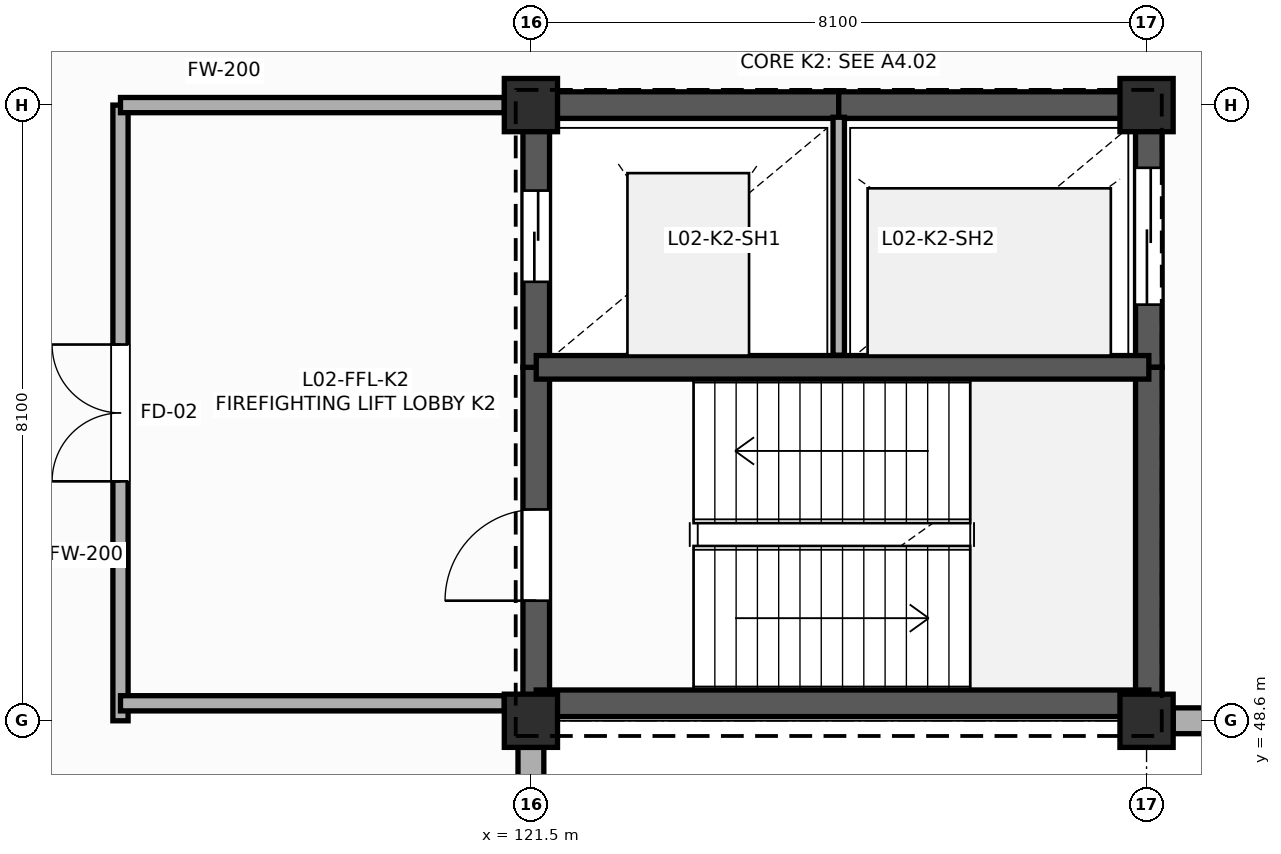
"""IFC4 building model, lengths in metres.
Left out: names, types, materials, properties, quantities, classifications, styles, units other than length and angle.
Written with IfcOpenShell. Run it as: python <this file> out.ifc"""

import sys

from ifc_helpers import new_model, si_unit, direction, frame, frame_2d, origin, origin_2d, place, context, subcontext, project, spatial, rectangle, extrude, element, fill, save


model = new_model("IFC4")
c1 = context("Model", 3, precision=1e-05, world=origin(), true_north=direction((0.0, 1.0)))
c2 = subcontext(c1, "Body", "Model", "MODEL_VIEW")
j1 = project(units=[si_unit("LENGTHUNIT", "METRE"), si_unit("PLANEANGLEUNIT", "RADIAN")], contexts=[c1])
p1 = place(None, origin())
s1 = spatial("IfcSite", under=j1, at=p1, CompositionType="ELEMENT")
p2 = place(p1, origin())
s2 = spatial("IfcBuilding", under=s1, at=p2, CompositionType="ELEMENT")
p3 = place(p2, frame((0.0, 0.0, 10.2)))
s3 = spatial("IfcBuildingStorey", under=s2, at=p3, CompositionType="ELEMENT", Elevation=10.2)
for number, where, z_axis, x_axis in (
    (1, (121.5, 48.6, 0.0), (0.0, 0.0, 1.0), (1.0, 0.0, 0.0)),
    (2, (121.5, 56.7, 0.0), (0.0, 0.0, 1.0), (1.0, 0.0, 0.0)),
    (3, (129.6, 48.6, 0.0), (0.0, 0.0, 1.0), (1.0, 0.0, 0.0)),
    (4, (129.6, 56.7, 0.0), (0.0, 0.0, 1.0), (1.0, 0.0, 0.0)),
):
    element("IfcColumn", number, at=place(p3, frame(where, z_axis=z_axis, x_axis=x_axis)), inside=s3, PredefinedType="COLUMN", context=c2, shape_type="SweptSolid", body=[
        extrude(rectangle(XDim=0.7, YDim=0.7, at=origin_2d()), origin(), (0.0, 0.0, 1.0), 4.8),
    ])
p4 = place(p3, frame((121.5, 40.8, 0.0), z_axis=(0.0, 0.0, 1.0), x_axis=(0.0, 1.0, 0.0)))
e5 = element("IfcWall", 5, at=p4, inside=s3, PredefinedType="SOLIDWALL", context=c2, shape_type="SweptSolid", body=[
    extrude(rectangle(XDim=7.45, YDim=0.34, at=frame_2d((3.725, 0.0))), origin(), (0.0, 0.0, 1.0), 4.207),
])
p5 = place(p3, frame((129.95, 48.6, 0.0), z_axis=(0.0, 0.0, 1.0), x_axis=(1.0, 0.0, 0.0)))
e6 = element("IfcWall", 6, at=p5, inside=s3, PredefinedType="SOLIDWALL", context=c2, shape_type="SweptSolid", body=[
    extrude(rectangle(XDim=7.4, YDim=0.34, at=frame_2d((3.7, 0.0))), origin(), (0.0, 0.0, 1.0), 4.075),
])
p6 = place(p3, frame((121.57, 48.83, 0.0), z_axis=(0.0, 0.0, 1.0), x_axis=(0.0, 1.0, 0.0)))
e7 = element("IfcWall", 7, at=p6, inside=s3, PredefinedType="SHEAR", context=c2, shape_type="SweptSolid", body=[
    extrude(rectangle(XDim=4.42, YDim=0.35, at=frame_2d((2.21, 0.0))), origin(), (0.0, 0.0, 1.0), 4.8),
])
p7 = place(p6, frame((1.35, 0.0, 0.0)))
e8 = element("IfcOpeningElement", 8, at=p7, cuts=e7, PredefinedType="OPENING", context=c2, shape_type="SweptSolid", body=[
    extrude(rectangle(XDim=1.2, YDim=2.25, at=frame_2d((0.6, 1.125))), frame((0.0, 0.185, 0.0), z_axis=(0.0, -1.0, 0.0), x_axis=(1.0, 0.0, 0.0)), (0.0, 0.0, 1.0), 0.37),
])
p8 = place(p3, frame((121.57, 53.25, 0.0), z_axis=(0.0, 0.0, 1.0), x_axis=(0.0, 1.0, 0.0)))
e9 = element("IfcWall", 9, at=p8, inside=s3, PredefinedType="SHEAR", context=c2, shape_type="SweptSolid", body=[
    extrude(rectangle(XDim=3.45, YDim=0.35, at=frame_2d((1.725, 0.0))), origin(), (0.0, 0.0, 1.0), 4.8),
])
p9 = place(p8, frame((1.125, 0.0, 0.0)))
e10 = element("IfcOpeningElement", 10, at=p9, cuts=e9, PredefinedType="OPENING", context=c2, shape_type="SweptSolid", body=[
    extrude(rectangle(XDim=1.2, YDim=2.2, at=frame_2d((0.6, 1.1))), frame((0.0, 0.185, 0.0), z_axis=(0.0, -1.0, 0.0), x_axis=(1.0, 0.0, 0.0)), (0.0, 0.0, 1.0), 0.37),
])
p10 = place(p3, frame((121.57, 56.7, 0.0), z_axis=(0.0, 0.0, 1.0), x_axis=(1.0, 0.0, 0.0)))
e11 = element("IfcWall", 11, at=p10, inside=s3, PredefinedType="SHEAR", context=c2, shape_type="SweptSolid", body=[
    extrude(rectangle(XDim=3.98, YDim=0.35, at=frame_2d((1.99, 0.0))), origin(), (0.0, 0.0, 1.0), 4.8),
])
p11 = place(p3, frame((125.55, 56.7, 0.0), z_axis=(0.0, 0.0, 1.0), x_axis=(1.0, 0.0, 0.0)))
e12 = element("IfcWall", 12, at=p11, inside=s3, PredefinedType="SHEAR", context=c2, shape_type="SweptSolid", body=[
    extrude(rectangle(XDim=4.08, YDim=0.35, at=frame_2d((2.04, 0.0))), origin(), (0.0, 0.0, 1.0), 4.8),
])
p12 = place(p3, frame((129.63, 56.7, 0.0), z_axis=(0.0, 0.0, 1.0), x_axis=(0.0, -1.0, 0.0)))
e13 = element("IfcWall", 13, at=p12, inside=s3, PredefinedType="SHEAR", context=c2, shape_type="SweptSolid", body=[
    extrude(rectangle(XDim=3.45, YDim=0.35, at=frame_2d((1.725, 0.0))), origin(), (0.0, 0.0, 1.0), 4.8),
])
p13 = place(p12, frame((0.825, 0.0, 0.0)))
e14 = element("IfcOpeningElement", 14, at=p13, cuts=e13, PredefinedType="OPENING", context=c2, shape_type="SweptSolid", body=[
    extrude(rectangle(XDim=1.8, YDim=2.4, at=frame_2d((0.9, 1.2))), frame((0.0, 0.185, 0.0), z_axis=(0.0, -1.0, 0.0), x_axis=(1.0, 0.0, 0.0)), (0.0, 0.0, 1.0), 0.37),
])
p14 = place(p3, frame((129.63, 53.25, 0.0), z_axis=(0.0, 0.0, 1.0), x_axis=(0.0, -1.0, 0.0)))
e15 = element("IfcWall", 15, at=p14, inside=s3, PredefinedType="SHEAR", context=c2, shape_type="SweptSolid", body=[
    extrude(rectangle(XDim=4.42, YDim=0.35, at=frame_2d((2.21, 0.0))), origin(), (0.0, 0.0, 1.0), 4.8),
])
p15 = place(p3, frame((129.63, 48.83, 0.0), z_axis=(0.0, 0.0, 1.0), x_axis=(-1.0, 0.0, 0.0)))
e16 = element("IfcWall", 16, at=p15, inside=s3, PredefinedType="SHEAR", context=c2, shape_type="SweptSolid", body=[
    extrude(rectangle(XDim=8.06, YDim=0.35, at=frame_2d((4.03, 0.0))), origin(), (0.0, 0.0, 1.0), 4.8),
])
p16 = place(p3, frame((121.57, 53.25, 0.0), z_axis=(0.0, 0.0, 1.0), x_axis=(1.0, 0.0, 0.0)))
e17 = element("IfcWall", 17, at=p16, inside=s3, PredefinedType="SHEAR", context=c2, shape_type="SweptSolid", body=[
    extrude(rectangle(XDim=8.06, YDim=0.31, at=frame_2d((4.03, 0.0))), origin(), (0.0, 0.0, 1.0), 4.8),
])
p17 = place(p3, frame((125.55, 53.41, 0.0), z_axis=(0.0, 0.0, 1.0), x_axis=(0.0, 1.0, 0.0)))
e18 = element("IfcWall", 18, at=p17, inside=s3, PredefinedType="PLUMBINGWALL", context=c2, shape_type="SweptSolid", body=[
    extrude(rectangle(XDim=3.13, YDim=0.15, at=frame_2d((1.565, 0.0))), origin(), (0.0, 0.0, 1.0), 4.45),
])
p18 = place(p3, frame((116.1, 48.6, 0.0), z_axis=(0.0, 0.0, 1.0), x_axis=(0.0, 1.0, 0.0)))
e19 = element("IfcWall", 19, at=p18, inside=s3, PredefinedType="PARTITIONING", context=c2, shape_type="SweptSolid", body=[
    extrude(rectangle(XDim=8.1, YDim=0.2, at=frame_2d((4.05, 0.0))), origin(), (0.0, 0.0, 1.0), 4.5),
])
p19 = place(p18, frame((3.15, 0.0, 0.0)))
e20 = element("IfcOpeningElement", 20, at=p19, cuts=e19, PredefinedType="OPENING", context=c2, shape_type="SweptSolid", body=[
    extrude(rectangle(XDim=1.8, YDim=2.25, at=frame_2d((0.9, 1.125))), frame((0.0, 0.11, 0.0), z_axis=(0.0, -1.0, 0.0), x_axis=(1.0, 0.0, 0.0)), (0.0, 0.0, 1.0), 0.22),
])
p20 = place(p3, frame((116.1, 56.7, 0.0), z_axis=(0.0, 0.0, 1.0), x_axis=(1.0, 0.0, 0.0)))
e21 = element("IfcWall", 21, at=p20, inside=s3, PredefinedType="PARTITIONING", context=c2, shape_type="SweptSolid", body=[
    extrude(rectangle(XDim=5.05, YDim=0.2, at=frame_2d((2.525, 0.0))), origin(), (0.0, 0.0, 1.0), 3.936),
])
p21 = place(p3, frame((121.15, 48.83, 0.0), z_axis=(0.0, 0.0, 1.0), x_axis=(-1.0, 0.0, 0.0)))
e22 = element("IfcWall", 22, at=p21, inside=s3, PredefinedType="PARTITIONING", context=c2, shape_type="SweptSolid", body=[
    extrude(rectangle(XDim=5.05, YDim=0.2, at=frame_2d((2.525, 0.0))), origin(), (0.0, 0.0, 1.0), 4.0),
])
p22 = place(p7, origin())
e23 = element("IfcDoor", 23, at=p22, inside=s3, OperationType="SINGLE_SWING_LEFT", PredefinedType="DOOR", context=c2, shape_type="SweptSolid", body=[
    extrude(rectangle(XDim=1.2, YDim=2.25, at=frame_2d((0.6, 1.125))), frame((0.0, 0.025, 0.0), z_axis=(0.0, -1.0, 0.0), x_axis=(1.0, 0.0, 0.0)), (0.0, 0.0, 1.0), 0.05),
])
fill(e8, e23)
p23 = place(p9, origin())
e24 = element("IfcDoor", 24, at=p23, inside=s3, OperationType="SLIDING_TO_LEFT", PredefinedType="DOOR", context=c2, shape_type="SweptSolid", body=[
    extrude(rectangle(XDim=1.2, YDim=2.2, at=frame_2d((0.6, 1.1))), frame((0.0, 0.025, 0.0), z_axis=(0.0, -1.0, 0.0), x_axis=(1.0, 0.0, 0.0)), (0.0, 0.0, 1.0), 0.05),
])
fill(e10, e24)
p24 = place(p13, origin())
e25 = element("IfcDoor", 25, at=p24, inside=s3, OperationType="SLIDING_TO_LEFT", PredefinedType="DOOR", context=c2, shape_type="SweptSolid", body=[
    extrude(rectangle(XDim=1.8, YDim=2.4, at=frame_2d((0.9, 1.2))), frame((0.0, 0.025, 0.0), z_axis=(0.0, -1.0, 0.0), x_axis=(1.0, 0.0, 0.0)), (0.0, 0.0, 1.0), 0.05),
])
fill(e14, e25)
p25 = place(p19, origin())
e26 = element("IfcDoor", 26, at=p25, inside=s3, OperationType="DOUBLE_DOOR_SINGLE_SWING", PredefinedType="DOOR", context=c2, shape_type="SweptSolid", body=[
    extrude(rectangle(XDim=1.8, YDim=2.25, at=frame_2d((0.9, 1.125))), frame((0.0, 0.025, 0.0), z_axis=(0.0, -1.0, 0.0), x_axis=(1.0, 0.0, 0.0)), (0.0, 0.0, 1.0), 0.05),
])
fill(e20, e26)
save(model, sys.argv[1])
